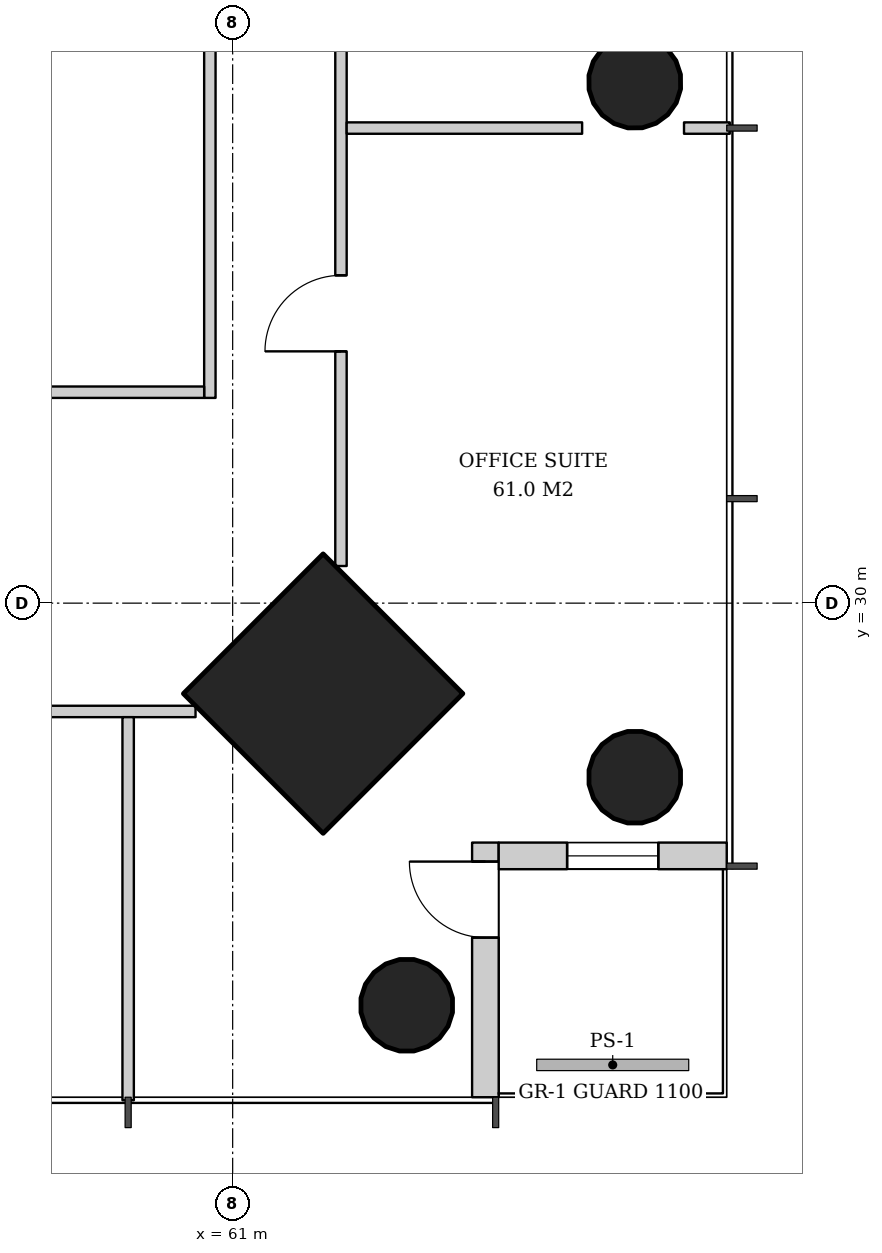
"""IFC4 building model, lengths in metres.
Left out: names, types, materials, properties, quantities, classifications, styles, units other than length and angle.
Written with IfcOpenShell. Run it as: python <this file> out.ifc"""

import sys

from ifc_helpers import new_model, si_unit, direction, frame, frame_2d, origin, origin_2d, place, context, subcontext, project, spatial, rectangle, hollow_circle, extrude, element, fill, save


model = new_model("IFC4")
c1 = context("Model", 3, precision=1e-05, world=origin(), true_north=direction((0.0, 1.0)))
c2 = subcontext(c1, "Body", "Model", "MODEL_VIEW")
j1 = project(units=[si_unit("LENGTHUNIT", "METRE"), si_unit("PLANEANGLEUNIT", "RADIAN")], contexts=[c1])
p1 = place(None, origin())
s1 = spatial("IfcSite", under=j1, at=p1, CompositionType="ELEMENT")
p2 = place(p1, origin())
s2 = spatial("IfcBuilding", under=s1, at=p2, CompositionType="ELEMENT")
p3 = place(p2, frame((0.0, 0.0, 104.6)))
s3 = spatial("IfcBuildingStorey", under=s2, at=p3, CompositionType="ELEMENT", Elevation=104.6)
p4 = place(p3, frame((66.329, 27.671, 0.0), z_axis=(-0.031964207655, 0.031964207655, 0.998977766949), x_axis=(-0.707106781187, -0.707106781187, 0.0)))
e1 = element("IfcColumn", 1, at=p4, inside=s3, PredefinedType="COLUMN", context=c2, shape_type="SweptSolid", body=[
    extrude(hollow_circle(Radius=0.61, WallThickness=0.04, at=origin_2d()), origin(), (0.0, 0.0, 1.0), 3.804),
])
p5 = place(p3, frame((66.329, 36.836, 0.0), z_axis=(-0.031976461511, 0.015988230756, 0.999360736865), x_axis=(-0.4472135955, -0.894427191, 0.0)))
e2 = element("IfcColumn", 2, at=p5, inside=s3, PredefinedType="COLUMN", context=c2, shape_type="SweptSolid", body=[
    extrude(hollow_circle(Radius=0.61, WallThickness=0.04, at=origin_2d()), origin(), (0.0, 0.0, 1.0), 3.802),
])
p6 = place(p3, frame((62.229, 28.771, 0.0), z_axis=(-0.031900153262, 0.031900153262, 0.998981861919), x_axis=(-0.707106781187, -0.707106781187, 0.0)))
e3 = element("IfcColumn", 3, at=p6, inside=s3, PredefinedType="COLUMN", context=c2, shape_type="SweptSolid", body=[
    extrude(rectangle(XDim=2.6, YDim=2.6, at=origin_2d()), origin(), (0.0, 0.0, 1.0), 3.804),
])
p7 = place(p3, frame((63.329, 24.671, 0.0), z_axis=(-0.031964207655, 0.031964207655, 0.998977766949), x_axis=(-0.707106781187, -0.707106781187, 0.0)))
e4 = element("IfcColumn", 4, at=p7, inside=s3, PredefinedType="COLUMN", context=c2, shape_type="SweptSolid", body=[
    extrude(hollow_circle(Radius=0.61, WallThickness=0.04, at=origin_2d()), origin(), (0.0, 0.0, 1.0), 3.804),
])
p8 = place(p3, frame((64.325, 23.5, 0.0), z_axis=(0.0, 0.0, 1.0), x_axis=(0.0, 1.0, 0.0)))
e5 = element("IfcWall", 5, at=p8, inside=s3, PredefinedType="SOLIDWALL", context=c2, shape_type="SweptSolid", body=[
    extrude(rectangle(XDim=3.35, YDim=0.35, at=frame_2d((1.675, 0.0))), origin(), (0.0, 0.0, 1.0), 3.62),
])
p9 = place(p8, frame((2.1, 0.0, 0.0)))
e6 = element("IfcOpeningElement", 6, at=p9, cuts=e5, PredefinedType="OPENING", context=c2, shape_type="SweptSolid", body=[
    extrude(rectangle(XDim=1.0, YDim=2.4, at=frame_2d((0.5, 1.2))), frame((0.0, 0.185, 0.0), z_axis=(0.0, -1.0, 0.0), x_axis=(1.0, 0.0, 0.0)), (0.0, 0.0, 1.0), 0.37),
])
p10 = place(p3, frame((64.5, 26.675, 0.0), z_axis=(0.0, 0.0, 1.0), x_axis=(1.0, 0.0, 0.0)))
e7 = element("IfcWall", 7, at=p10, inside=s3, PredefinedType="SOLIDWALL", context=c2, shape_type="SweptSolid", body=[
    extrude(rectangle(XDim=3.0, YDim=0.35, at=frame_2d((1.5, 0.0))), origin(), (0.0, 0.0, 1.0), 3.62),
])
p11 = place(p10, frame((0.9, 0.0, 0.6)))
e8 = element("IfcOpeningElement", 8, at=p11, cuts=e7, PredefinedType="OPENING", context=c2, shape_type="SweptSolid", body=[
    extrude(rectangle(XDim=1.2, YDim=2.55, at=frame_2d((0.6, 1.275))), frame((0.0, 0.185, 0.0), z_axis=(0.0, -1.0, 0.0), x_axis=(1.0, 0.0, 0.0)), (0.0, 0.0, 1.0), 0.37),
])
p12 = place(p3, frame((60.7, 32.7, 0.0), z_axis=(0.0, 0.0, 1.0), x_axis=(0.0, 1.0, 0.0)))
e9 = element("IfcWall", 9, at=p12, inside=s3, PredefinedType="PARTITIONING", context=c2, shape_type="SweptSolid", body=[
    extrude(rectangle(XDim=11.275, YDim=0.15, at=frame_2d((5.638, 0.0))), origin(), (0.0, 0.0, 1.0), 2.72),
])
p13 = place(p12, frame((5.137, 0.0, 0.0)))
e10 = element("IfcOpeningElement", 10, at=p13, cuts=e9, PredefinedType="OPENING", context=c2, shape_type="SweptSolid", body=[
    extrude(rectangle(XDim=1.0, YDim=2.1, at=frame_2d((0.5, 1.05))), frame((0.0, 0.085, 0.0), z_axis=(0.0, -1.0, 0.0), x_axis=(1.0, 0.0, 0.0)), (0.0, 0.0, 1.0), 0.17),
])
p14 = place(p3, frame((58.3, 32.775, 0.0), z_axis=(0.0, 0.0, 1.0), x_axis=(1.0, 0.0, 0.0)))
e11 = element("IfcWall", 11, at=p14, inside=s3, PredefinedType="PARTITIONING", context=c2, shape_type="SweptSolid", body=[
    extrude(rectangle(XDim=2.325, YDim=0.15, at=frame_2d((1.163, 0.0))), origin(), (0.0, 0.0, 1.0), 3.62),
])
p15 = place(p3, frame((62.425, 30.489, 0.0), z_axis=(0.0, 0.0, 1.0), x_axis=(0.0, 1.0, 0.0)))
e12 = element("IfcWall", 12, at=p15, inside=s3, PredefinedType="PARTITIONING", context=c2, shape_type="SweptSolid", body=[
    extrude(rectangle(XDim=31.023, YDim=0.15, at=frame_2d((15.511, 0.0))), origin(), (0.0, 0.0, 1.0), 2.72),
])
p16 = place(p15, frame((2.824, 0.0, 0.0)))
e13 = element("IfcOpeningElement", 13, at=p16, cuts=e12, PredefinedType="OPENING", context=c2, shape_type="SweptSolid", body=[
    extrude(rectangle(XDim=1.0, YDim=2.1, at=frame_2d((0.5, 1.05))), frame((0.0, 0.085, 0.0), z_axis=(0.0, -1.0, 0.0), x_axis=(1.0, 0.0, 0.0)), (0.0, 0.0, 1.0), 0.17),
])
p17 = place(p15, frame((7.699, 0.0, 0.0)))
e14 = element("IfcOpeningElement", 14, at=p17, cuts=e12, PredefinedType="OPENING", context=c2, shape_type="SweptSolid", body=[
    extrude(rectangle(XDim=1.0, YDim=2.1, at=frame_2d((0.5, 1.05))), frame((0.0, 0.085, 0.0), z_axis=(0.0, -1.0, 0.0), x_axis=(1.0, 0.0, 0.0)), (0.0, 0.0, 1.0), 0.17),
])
p18 = place(p15, frame((12.574, 0.0, 0.0)))
e15 = element("IfcOpeningElement", 15, at=p18, cuts=e12, PredefinedType="OPENING", context=c2, shape_type="SweptSolid", body=[
    extrude(rectangle(XDim=1.0, YDim=2.1, at=frame_2d((0.5, 1.05))), frame((0.0, 0.085, 0.0), z_axis=(0.0, -1.0, 0.0), x_axis=(1.0, 0.0, 0.0)), (0.0, 0.0, 1.0), 0.17),
])
p19 = place(p15, frame((17.449, 0.0, 0.0)))
e16 = element("IfcOpeningElement", 16, at=p19, cuts=e12, PredefinedType="OPENING", context=c2, shape_type="SweptSolid", body=[
    extrude(rectangle(XDim=1.0, YDim=2.1, at=frame_2d((0.5, 1.05))), frame((0.0, 0.085, 0.0), z_axis=(0.0, -1.0, 0.0), x_axis=(1.0, 0.0, 0.0)), (0.0, 0.0, 1.0), 0.17),
])
p20 = place(p15, frame((22.324, 0.0, 0.0)))
e17 = element("IfcOpeningElement", 17, at=p20, cuts=e12, PredefinedType="OPENING", context=c2, shape_type="SweptSolid", body=[
    extrude(rectangle(XDim=1.0, YDim=2.1, at=frame_2d((0.5, 1.05))), frame((0.0, 0.085, 0.0), z_axis=(0.0, -1.0, 0.0), x_axis=(1.0, 0.0, 0.0)), (0.0, 0.0, 1.0), 0.17),
])
p21 = place(p15, frame((27.199, 0.0, 0.0)))
e18 = element("IfcOpeningElement", 18, at=p21, cuts=e12, PredefinedType="OPENING", context=c2, shape_type="SweptSolid", body=[
    extrude(rectangle(XDim=1.0, YDim=2.1, at=frame_2d((0.5, 1.05))), frame((0.0, 0.085, 0.0), z_axis=(0.0, -1.0, 0.0), x_axis=(1.0, 0.0, 0.0)), (0.0, 0.0, 1.0), 0.17),
])
p22 = place(p3, frame((62.5, 36.25, 0.0), z_axis=(0.0, 0.0, 1.0), x_axis=(1.0, 0.0, 0.0)))
e19 = element("IfcWall", 19, at=p22, inside=s3, PredefinedType="PARTITIONING", context=c2, shape_type="SweptSolid", body=[
    extrude(rectangle(XDim=3.098, YDim=0.15, at=frame_2d((1.549, 0.0))), origin(), (0.0, 0.0, 1.0), 3.62),
])
p23 = place(p3, frame((66.938, 36.25, 0.0), z_axis=(0.0, 0.0, 1.0), x_axis=(1.0, 0.0, 0.0)))
e20 = element("IfcWall", 20, at=p23, inside=s3, PredefinedType="PARTITIONING", context=c2, shape_type="SweptSolid", body=[
    extrude(rectangle(XDim=0.602, YDim=0.15, at=frame_2d((0.301, 0.0))), origin(), (0.0, 0.0, 1.0), 3.62),
])
p24 = place(p3, frame((29.489, 28.575, 0.0), z_axis=(0.0, 0.0, 1.0), x_axis=(1.0, 0.0, 0.0)))
e21 = element("IfcWall", 21, at=p24, inside=s3, PredefinedType="PARTITIONING", context=c2, shape_type="SweptSolid", body=[
    extrude(rectangle(XDim=31.023, YDim=0.15, at=frame_2d((15.511, 0.0))), origin(), (0.0, 0.0, 1.0), 2.72),
])
p25 = place(p24, frame((2.424, 0.0, 0.0)))
e22 = element("IfcOpeningElement", 22, at=p25, cuts=e21, PredefinedType="OPENING", context=c2, shape_type="SweptSolid", body=[
    extrude(rectangle(XDim=1.8, YDim=2.4, at=frame_2d((0.9, 1.2))), frame((0.0, 0.085, 0.0), z_axis=(0.0, -1.0, 0.0), x_axis=(1.0, 0.0, 0.0)), (0.0, 0.0, 1.0), 0.17),
])
p26 = place(p24, frame((7.299, 0.0, 0.0)))
e23 = element("IfcOpeningElement", 23, at=p26, cuts=e21, PredefinedType="OPENING", context=c2, shape_type="SweptSolid", body=[
    extrude(rectangle(XDim=1.8, YDim=2.4, at=frame_2d((0.9, 1.2))), frame((0.0, 0.085, 0.0), z_axis=(0.0, -1.0, 0.0), x_axis=(1.0, 0.0, 0.0)), (0.0, 0.0, 1.0), 0.17),
])
p27 = place(p3, frame((59.625, 28.5, 0.0), z_axis=(0.0, 0.0, 1.0), x_axis=(0.0, -1.0, 0.0)))
e24 = element("IfcWall", 24, at=p27, inside=s3, PredefinedType="PARTITIONING", context=c2, shape_type="SweptSolid", body=[
    extrude(rectangle(XDim=5.04, YDim=0.15, at=frame_2d((2.52, 0.0))), origin(), (0.0, 0.0, 1.0), 2.82),
])
p28 = place(p9, origin())
e25 = element("IfcDoor", 25, at=p28, inside=s3, OperationType="SINGLE_SWING_RIGHT", PredefinedType="DOOR", context=c2, shape_type="SweptSolid", body=[
    extrude(rectangle(XDim=1.0, YDim=2.4, at=frame_2d((0.5, 1.2))), frame((0.0, 0.025, 0.0), z_axis=(0.0, -1.0, 0.0), x_axis=(1.0, 0.0, 0.0)), (0.0, 0.0, 1.0), 0.05),
])
fill(e6, e25)
p29 = place(p11, origin())
e26 = element("IfcWindow", 26, at=p29, inside=s3, PartitioningType="SINGLE_PANEL", PredefinedType="WINDOW", context=c2, shape_type="SweptSolid", body=[
    extrude(rectangle(XDim=1.2, YDim=2.55, at=frame_2d((0.6, 1.275))), frame((0.0, 0.03, 0.0), z_axis=(0.0, -1.0, 0.0), x_axis=(1.0, 0.0, 0.0)), (0.0, 0.0, 1.0), 0.06),
])
fill(e8, e26)
p30 = place(p16, origin())
e27 = element("IfcDoor", 27, at=p30, inside=s3, OperationType="SINGLE_SWING_LEFT", PredefinedType="DOOR", context=c2, shape_type="SweptSolid", body=[
    extrude(rectangle(XDim=1.0, YDim=2.1, at=frame_2d((0.5, 1.05))), frame((0.0, 0.025, 0.0), z_axis=(0.0, -1.0, 0.0), x_axis=(1.0, 0.0, 0.0)), (0.0, 0.0, 1.0), 0.05),
])
fill(e13, e27)
save(model, sys.argv[1])
